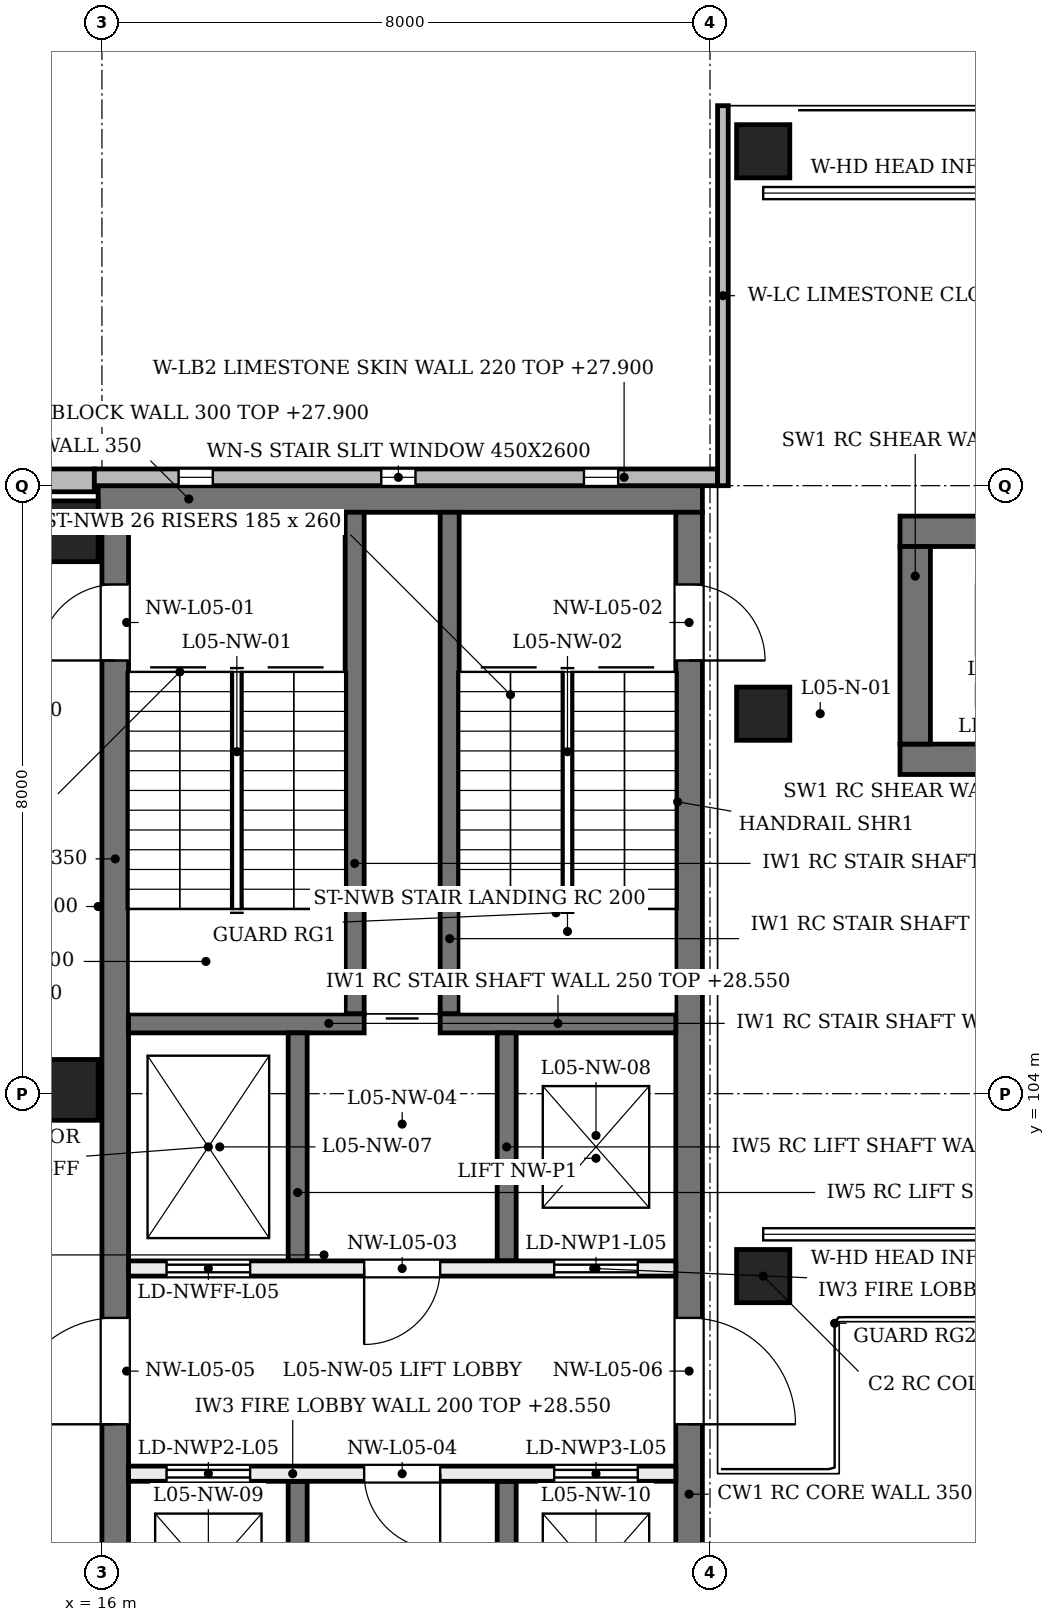
"""IFC4 building model, lengths in metres.
Left out: names, types, materials, properties, quantities, classifications, styles, units other than length and angle.
Written with IfcOpenShell. Run it as: python <this file> out.ifc"""

import sys

from ifc_helpers import new_model, si_unit, direction, frame, frame_2d, origin, origin_2d, place, context, subcontext, project, spatial, rectangle, extrude, element, fill, save


model = new_model("IFC4")
c1 = context("Model", 3, precision=1e-05, world=origin(), true_north=direction((0.0, 1.0)))
c2 = subcontext(c1, "Body", "Model", "MODEL_VIEW")
j1 = project(units=[si_unit("LENGTHUNIT", "METRE"), si_unit("PLANEANGLEUNIT", "RADIAN")], contexts=[c1])
p1 = place(None, origin())
s1 = spatial("IfcSite", under=j1, at=p1, CompositionType="ELEMENT")
p2 = place(p1, origin())
s2 = spatial("IfcBuilding", under=s1, at=p2, CompositionType="ELEMENT")
p3 = place(p2, frame((0.0, 0.0, 24.0)))
s3 = spatial("IfcBuildingStorey", under=s2, at=p3, CompositionType="ELEMENT", Elevation=24.0)
p4 = place(p3, frame((26.5, 108.4, 0.0), z_axis=(0.0, 0.0, 1.0), x_axis=(1.0, 0.0, 0.0)))
e1 = element("IfcWall", 1, at=p4, inside=s3, PredefinedType="SHEAR", context=c2, shape_type="SweptSolid", body=[
    extrude(rectangle(XDim=6.0, YDim=0.4, at=frame_2d((3.0, 0.0))), origin(), (0.0, 0.0, 1.0), 4.58),
])
p5 = place(p4, frame((1.15, 0.0, 0.0)))
e2 = element("IfcOpeningElement", 2, at=p5, cuts=e1, PredefinedType="OPENING", context=c2, shape_type="SweptSolid", body=[
    extrude(rectangle(XDim=1.1, YDim=2.1, at=frame_2d((0.55, 1.05))), frame((0.0, 0.21, 0.0), z_axis=(0.0, -1.0, 0.0), x_axis=(1.0, 0.0, 0.0)), (0.0, 0.0, 1.0), 0.42),
])
p6 = place(p4, frame((3.75, 0.0, 0.0)))
e3 = element("IfcOpeningElement", 3, at=p6, cuts=e1, PredefinedType="OPENING", context=c2, shape_type="SweptSolid", body=[
    extrude(rectangle(XDim=1.1, YDim=2.1, at=frame_2d((0.55, 1.05))), frame((0.0, 0.21, 0.0), z_axis=(0.0, -1.0, 0.0), x_axis=(1.0, 0.0, 0.0)), (0.0, 0.0, 1.0), 0.42),
])
p7 = place(p3, frame((26.5, 111.4, 0.0), z_axis=(0.0, 0.0, 1.0), x_axis=(1.0, 0.0, 0.0)))
e4 = element("IfcWall", 4, at=p7, inside=s3, PredefinedType="SHEAR", context=c2, shape_type="SweptSolid", body=[
    extrude(rectangle(XDim=6.0, YDim=0.4, at=frame_2d((3.0, 0.0))), origin(), (0.0, 0.0, 1.0), 4.58),
])
p8 = place(p3, frame((26.7, 108.6, 0.0), z_axis=(0.0, 0.0, 1.0), x_axis=(0.0, 1.0, 0.0)))
e5 = element("IfcWall", 5, at=p8, inside=s3, PredefinedType="SHEAR", context=c2, shape_type="SweptSolid", body=[
    extrude(rectangle(XDim=2.6, YDim=0.4, at=frame_2d((1.3, 0.0))), origin(), (0.0, 0.0, 1.0), 4.58),
])
p9 = place(p3, frame((15.95, 111.825, 0.0), z_axis=(0.0, 0.0, 1.0), x_axis=(1.0, 0.0, 0.0)))
e6 = element("IfcWall", 6, at=p9, inside=s3, PredefinedType="SHEAR", context=c2, shape_type="SweptSolid", body=[
    extrude(rectangle(XDim=7.95, YDim=0.35, at=frame_2d((3.975, 0.0))), origin(), (0.0, 0.0, 1.0), 4.58),
])
p10 = place(p3, frame((16.175, 96.45, 0.0), z_axis=(0.0, 0.0, 1.0), x_axis=(0.0, 1.0, 0.0)))
e7 = element("IfcWall", 7, at=p10, inside=s3, PredefinedType="SHEAR", context=c2, shape_type="SweptSolid", body=[
    extrude(rectangle(XDim=15.2, YDim=0.35, at=frame_2d((7.6, 0.0))), origin(), (0.0, 0.0, 1.0), 4.58),
])
p11 = place(p10, frame((13.25, 0.0, 0.0)))
e8 = element("IfcOpeningElement", 8, at=p11, cuts=e7, PredefinedType="OPENING", context=c2, shape_type="SweptSolid", body=[
    extrude(rectangle(XDim=1.0, YDim=2.1, at=frame_2d((0.5, 1.05))), frame((0.0, 0.185, 0.0), z_axis=(0.0, -1.0, 0.0), x_axis=(1.0, 0.0, 0.0)), (0.0, 0.0, 1.0), 0.37),
])
p12 = place(p10, frame((3.2, 0.0, 0.0)))
e9 = element("IfcOpeningElement", 9, at=p12, cuts=e7, PredefinedType="OPENING", context=c2, shape_type="SweptSolid", body=[
    extrude(rectangle(XDim=1.4, YDim=2.1, at=frame_2d((0.7, 1.05))), frame((0.0, 0.185, 0.0), z_axis=(0.0, -1.0, 0.0), x_axis=(1.0, 0.0, 0.0)), (0.0, 0.0, 1.0), 0.37),
])
p13 = place(p3, frame((23.725, 96.45, 0.0), z_axis=(0.0, 0.0, 1.0), x_axis=(0.0, 1.0, 0.0)))
e10 = element("IfcWall", 10, at=p13, inside=s3, PredefinedType="SHEAR", context=c2, shape_type="SweptSolid", body=[
    extrude(rectangle(XDim=15.2, YDim=0.35, at=frame_2d((7.6, 0.0))), origin(), (0.0, 0.0, 1.0), 4.58),
])
p14 = place(p13, frame((13.25, 0.0, 0.0)))
e11 = element("IfcOpeningElement", 11, at=p14, cuts=e10, PredefinedType="OPENING", context=c2, shape_type="SweptSolid", body=[
    extrude(rectangle(XDim=1.0, YDim=2.1, at=frame_2d((0.5, 1.05))), frame((0.0, 0.185, 0.0), z_axis=(0.0, -1.0, 0.0), x_axis=(1.0, 0.0, 0.0)), (0.0, 0.0, 1.0), 0.37),
])
p15 = place(p13, frame((3.2, 0.0, 0.0)))
e12 = element("IfcOpeningElement", 12, at=p15, cuts=e10, PredefinedType="OPENING", context=c2, shape_type="SweptSolid", body=[
    extrude(rectangle(XDim=1.4, YDim=2.1, at=frame_2d((0.7, 1.05))), frame((0.0, 0.185, 0.0), z_axis=(0.0, -1.0, 0.0), x_axis=(1.0, 0.0, 0.0)), (0.0, 0.0, 1.0), 0.37),
])
for number, where, z_axis, x_axis in (
    (13, (15.55, 104.05, 0.0), (0.0, 0.0, 1.0), (1.0, 0.0, 0.0)),
    (14, (15.55, 111.4, 0.0), (0.0, 0.0, 1.0), (1.0, 0.0, 0.0)),
):
    element("IfcColumn", number, at=place(p3, frame(where, z_axis=z_axis, x_axis=x_axis)), inside=s3, PredefinedType="COLUMN", context=c2, shape_type="SweptSolid", body=[
        extrude(rectangle(XDim=0.8, YDim=0.8, at=origin_2d()), origin(), (0.0, 0.0, 1.0), 4.58),
    ])
for number, where, z_axis, x_axis in (
    (15, (24.7, 101.6, 0.0), (0.0, 0.0, 1.0), (1.0, 0.0, 0.0)),
    (16, (24.7, 109.0, 0.0), (0.0, 0.0, 1.0), (1.0, 0.0, 0.0)),
    (17, (24.7, 116.4, 0.0), (0.0, 0.0, 1.0), (1.0, 0.0, 0.0)),
):
    element("IfcColumn", number, at=place(p3, frame(where, z_axis=z_axis, x_axis=x_axis)), inside=s3, PredefinedType="COLUMN", context=c2, shape_type="SweptSolid", body=[
        extrude(rectangle(XDim=0.7, YDim=0.7, at=origin_2d()), origin(), (0.0, 0.0, 1.0), 4.58),
    ])
for number, where, z_axis, x_axis in (
    (18, (24.9, 115.85, 4.1), (0.0, 0.0, 1.0), (1.0, 0.0, 0.0)),
    (19, (24.9, 102.15, 4.1), (0.0, 0.0, 1.0), (1.0, 0.0, 0.0)),
):
    element("IfcWall", number, at=place(p3, frame(where, z_axis=z_axis, x_axis=x_axis)), inside=s3, PredefinedType="SOLIDWALL", context=c2, shape_type="SweptSolid", body=[
        extrude(rectangle(XDim=6.9, YDim=0.15, at=frame_2d((3.45, 0.0))), origin(), (0.0, 0.0, 1.0), 0.48),
    ])
p16 = place(p3, frame((8.0, 112.07, 0.0), z_axis=(0.0, 0.0, 1.0), x_axis=(1.0, 0.0, 0.0)))
e20 = element("IfcWall", 20, at=p16, inside=s3, PredefinedType="SOLIDWALL", context=c2, shape_type="SweptSolid", body=[
    extrude(rectangle(XDim=7.9, YDim=0.3, at=frame_2d((3.95, 0.0))), origin(), (0.0, 0.0, 1.0), 3.9),
])
p17 = place(p16, frame((0.717, 0.0, 1.0)))
e21 = element("IfcOpeningElement", 21, at=p17, cuts=e20, PredefinedType="OPENING", context=c2, shape_type="SweptSolid", body=[
    extrude(rectangle(XDim=1.2, YDim=2.4, at=frame_2d((0.6, 1.2))), frame((0.0, 0.16, 0.0), z_axis=(0.0, -1.0, 0.0), x_axis=(1.0, 0.0, 0.0)), (0.0, 0.0, 1.0), 0.32),
])
p18 = place(p16, frame((3.35, 0.0, 1.0)))
e22 = element("IfcOpeningElement", 22, at=p18, cuts=e20, PredefinedType="OPENING", context=c2, shape_type="SweptSolid", body=[
    extrude(rectangle(XDim=1.2, YDim=2.4, at=frame_2d((0.6, 1.2))), frame((0.0, 0.16, 0.0), z_axis=(0.0, -1.0, 0.0), x_axis=(1.0, 0.0, 0.0)), (0.0, 0.0, 1.0), 0.32),
])
p19 = place(p16, frame((5.983, 0.0, 1.0)))
e23 = element("IfcOpeningElement", 23, at=p19, cuts=e20, PredefinedType="OPENING", context=c2, shape_type="SweptSolid", body=[
    extrude(rectangle(XDim=1.2, YDim=2.4, at=frame_2d((0.6, 1.2))), frame((0.0, 0.16, 0.0), z_axis=(0.0, -1.0, 0.0), x_axis=(1.0, 0.0, 0.0)), (0.0, 0.0, 1.0), 0.32),
])
p20 = place(p3, frame((15.9, 112.11, 0.0), z_axis=(0.0, 0.0, 1.0), x_axis=(1.0, 0.0, 0.0)))
e24 = element("IfcWall", 24, at=p20, inside=s3, PredefinedType="SOLIDWALL", context=c2, shape_type="SweptSolid", body=[
    extrude(rectangle(XDim=8.2, YDim=0.22, at=frame_2d((4.1, 0.0))), origin(), (0.0, 0.0, 1.0), 3.9),
])
p21 = place(p20, frame((1.108, 0.0, 0.9)))
e25 = element("IfcOpeningElement", 25, at=p21, cuts=e24, PredefinedType="OPENING", context=c2, shape_type="SweptSolid", body=[
    extrude(rectangle(XDim=0.45, YDim=2.6, at=frame_2d((0.225, 1.3))), frame((0.0, 0.12, 0.0), z_axis=(0.0, -1.0, 0.0), x_axis=(1.0, 0.0, 0.0)), (0.0, 0.0, 1.0), 0.24),
])
p22 = place(p20, frame((3.775, 0.0, 0.9)))
e26 = element("IfcOpeningElement", 26, at=p22, cuts=e24, PredefinedType="OPENING", context=c2, shape_type="SweptSolid", body=[
    extrude(rectangle(XDim=0.45, YDim=2.6, at=frame_2d((0.225, 1.3))), frame((0.0, 0.12, 0.0), z_axis=(0.0, -1.0, 0.0), x_axis=(1.0, 0.0, 0.0)), (0.0, 0.0, 1.0), 0.24),
])
p23 = place(p20, frame((6.442, 0.0, 0.9)))
e27 = element("IfcOpeningElement", 27, at=p23, cuts=e24, PredefinedType="OPENING", context=c2, shape_type="SweptSolid", body=[
    extrude(rectangle(XDim=0.45, YDim=2.6, at=frame_2d((0.225, 1.3))), frame((0.0, 0.12, 0.0), z_axis=(0.0, -1.0, 0.0), x_axis=(1.0, 0.0, 0.0)), (0.0, 0.0, 1.0), 0.24),
])
p24 = place(p3, frame((24.17, 112.0, 0.0), z_axis=(0.0, 0.0, 1.0), x_axis=(0.0, 1.0, 0.0)))
e28 = element("IfcWall", 28, at=p24, inside=s3, PredefinedType="SOLIDWALL", context=c2, shape_type="SweptSolid", body=[
    extrude(rectangle(XDim=5.0, YDim=0.14, at=frame_2d((2.5, 0.0))), origin(), (0.0, 0.0, 1.0), 3.9),
])
for number, where, z_axis, x_axis in (
    (29, (19.325, 111.65, 0.0), (0.0, 0.0, 1.0), (0.0, -1.0, 0.0)),
    (30, (20.575, 111.65, 0.0), (0.0, 0.0, 1.0), (0.0, -1.0, 0.0)),
):
    element("IfcWall", number, at=place(p3, frame(where, z_axis=z_axis, x_axis=x_axis)), inside=s3, PredefinedType="SOLIDWALL", context=c2, shape_type="SweptSolid", body=[
        extrude(rectangle(XDim=6.6, YDim=0.25, at=frame_2d((3.3, 0.0))), origin(), (0.0, 0.0, 1.0), 4.55),
    ])
p25 = place(p3, frame((16.35, 104.925, 0.0), z_axis=(0.0, 0.0, 1.0), x_axis=(1.0, 0.0, 0.0)))
e31 = element("IfcWall", 31, at=p25, inside=s3, PredefinedType="SOLIDWALL", context=c2, shape_type="SweptSolid", body=[
    extrude(rectangle(XDim=3.1, YDim=0.25, at=frame_2d((1.55, 0.0))), origin(), (0.0, 0.0, 1.0), 4.55),
])
p26 = place(p3, frame((20.45, 104.925, 0.0), z_axis=(0.0, 0.0, 1.0), x_axis=(1.0, 0.0, 0.0)))
e32 = element("IfcWall", 32, at=p26, inside=s3, PredefinedType="SOLIDWALL", context=c2, shape_type="SweptSolid", body=[
    extrude(rectangle(XDim=3.1, YDim=0.25, at=frame_2d((1.55, 0.0))), origin(), (0.0, 0.0, 1.0), 4.55),
])
p27 = place(p3, frame((18.575, 104.8, 0.0), z_axis=(0.0, 0.0, 1.0), x_axis=(0.0, -1.0, 0.0)))
e33 = element("IfcWall", 33, at=p27, inside=s3, PredefinedType="SOLIDWALL", context=c2, shape_type="SweptSolid", body=[
    extrude(rectangle(XDim=3.0, YDim=0.25, at=frame_2d((1.5, 0.0))), origin(), (0.0, 0.0, 1.0), 4.55),
])
p28 = place(p3, frame((18.575, 98.9, 0.0), z_axis=(0.0, 0.0, 1.0), x_axis=(0.0, -1.0, 0.0)))
e34 = element("IfcWall", 34, at=p28, inside=s3, PredefinedType="SOLIDWALL", context=c2, shape_type="SweptSolid", body=[
    extrude(rectangle(XDim=2.45, YDim=0.25, at=frame_2d((1.225, 0.0))), origin(), (0.0, 0.0, 1.0), 4.55),
])
p29 = place(p3, frame((21.325, 104.8, 0.0), z_axis=(0.0, 0.0, 1.0), x_axis=(0.0, -1.0, 0.0)))
e35 = element("IfcWall", 35, at=p29, inside=s3, PredefinedType="SOLIDWALL", context=c2, shape_type="SweptSolid", body=[
    extrude(rectangle(XDim=3.0, YDim=0.25, at=frame_2d((1.5, 0.0))), origin(), (0.0, 0.0, 1.0), 4.55),
])
p30 = place(p3, frame((21.325, 98.9, 0.0), z_axis=(0.0, 0.0, 1.0), x_axis=(0.0, -1.0, 0.0)))
e36 = element("IfcWall", 36, at=p30, inside=s3, PredefinedType="SOLIDWALL", context=c2, shape_type="SweptSolid", body=[
    extrude(rectangle(XDim=2.45, YDim=0.25, at=frame_2d((1.225, 0.0))), origin(), (0.0, 0.0, 1.0), 4.55),
])
p31 = place(p3, frame((16.35, 101.7, 0.0), z_axis=(0.0, 0.0, 1.0), x_axis=(1.0, 0.0, 0.0)))
e37 = element("IfcWall", 37, at=p31, inside=s3, PredefinedType="SOLIDWALL", context=c2, shape_type="SweptSolid", body=[
    extrude(rectangle(XDim=7.2, YDim=0.2, at=frame_2d((3.6, 0.0))), origin(), (0.0, 0.0, 1.0), 4.55),
])
p32 = place(p31, frame((0.5, 0.0, 0.0)))
e38 = element("IfcOpeningElement", 38, at=p32, cuts=e37, PredefinedType="OPENING", context=c2, shape_type="SweptSolid", body=[
    extrude(rectangle(XDim=1.1, YDim=2.1, at=frame_2d((0.55, 1.05))), frame((0.0, 0.11, 0.0), z_axis=(0.0, -1.0, 0.0), x_axis=(1.0, 0.0, 0.0)), (0.0, 0.0, 1.0), 0.22),
])
p33 = place(p31, frame((5.6, 0.0, 0.0)))
e39 = element("IfcOpeningElement", 39, at=p33, cuts=e37, PredefinedType="OPENING", context=c2, shape_type="SweptSolid", body=[
    extrude(rectangle(XDim=1.1, YDim=2.1, at=frame_2d((0.55, 1.05))), frame((0.0, 0.11, 0.0), z_axis=(0.0, -1.0, 0.0), x_axis=(1.0, 0.0, 0.0)), (0.0, 0.0, 1.0), 0.22),
])
p34 = place(p31, frame((3.1, 0.0, 0.0)))
e40 = element("IfcOpeningElement", 40, at=p34, cuts=e37, PredefinedType="OPENING", context=c2, shape_type="SweptSolid", body=[
    extrude(rectangle(XDim=1.0, YDim=2.1, at=frame_2d((0.5, 1.05))), frame((0.0, 0.11, 0.0), z_axis=(0.0, -1.0, 0.0), x_axis=(1.0, 0.0, 0.0)), (0.0, 0.0, 1.0), 0.22),
])
p35 = place(p3, frame((16.35, 99.0, 0.0), z_axis=(0.0, 0.0, 1.0), x_axis=(1.0, 0.0, 0.0)))
e41 = element("IfcWall", 41, at=p35, inside=s3, PredefinedType="SOLIDWALL", context=c2, shape_type="SweptSolid", body=[
    extrude(rectangle(XDim=7.2, YDim=0.2, at=frame_2d((3.6, 0.0))), origin(), (0.0, 0.0, 1.0), 4.55),
])
p36 = place(p35, frame((0.5, 0.0, 0.0)))
e42 = element("IfcOpeningElement", 42, at=p36, cuts=e41, PredefinedType="OPENING", context=c2, shape_type="SweptSolid", body=[
    extrude(rectangle(XDim=1.1, YDim=2.1, at=frame_2d((0.55, 1.05))), frame((0.0, 0.11, 0.0), z_axis=(0.0, -1.0, 0.0), x_axis=(1.0, 0.0, 0.0)), (0.0, 0.0, 1.0), 0.22),
])
p37 = place(p35, frame((5.6, 0.0, 0.0)))
e43 = element("IfcOpeningElement", 43, at=p37, cuts=e41, PredefinedType="OPENING", context=c2, shape_type="SweptSolid", body=[
    extrude(rectangle(XDim=1.1, YDim=2.1, at=frame_2d((0.55, 1.05))), frame((0.0, 0.11, 0.0), z_axis=(0.0, -1.0, 0.0), x_axis=(1.0, 0.0, 0.0)), (0.0, 0.0, 1.0), 0.22),
])
p38 = place(p35, frame((3.1, 0.0, 0.0)))
e44 = element("IfcOpeningElement", 44, at=p38, cuts=e41, PredefinedType="OPENING", context=c2, shape_type="SweptSolid", body=[
    extrude(rectangle(XDim=1.0, YDim=2.1, at=frame_2d((0.5, 1.05))), frame((0.0, 0.11, 0.0), z_axis=(0.0, -1.0, 0.0), x_axis=(1.0, 0.0, 0.0)), (0.0, 0.0, 1.0), 0.22),
])
p39 = place(p21, origin())
e45 = element("IfcWindow", 45, at=p39, inside=s3, PartitioningType="SINGLE_PANEL", PredefinedType="WINDOW", context=c2, shape_type="SweptSolid", body=[
    extrude(rectangle(XDim=0.45, YDim=2.6, at=frame_2d((0.225, 1.3))), frame((0.0, 0.03, 0.0), z_axis=(0.0, -1.0, 0.0), x_axis=(1.0, 0.0, 0.0)), (0.0, 0.0, 1.0), 0.06),
])
fill(e25, e45)
p40 = place(p22, origin())
e46 = element("IfcWindow", 46, at=p40, inside=s3, PartitioningType="SINGLE_PANEL", PredefinedType="WINDOW", context=c2, shape_type="SweptSolid", body=[
    extrude(rectangle(XDim=0.45, YDim=2.6, at=frame_2d((0.225, 1.3))), frame((0.0, 0.03, 0.0), z_axis=(0.0, -1.0, 0.0), x_axis=(1.0, 0.0, 0.0)), (0.0, 0.0, 1.0), 0.06),
])
fill(e26, e46)
p41 = place(p23, origin())
e47 = element("IfcWindow", 47, at=p41, inside=s3, PartitioningType="SINGLE_PANEL", PredefinedType="WINDOW", context=c2, shape_type="SweptSolid", body=[
    extrude(rectangle(XDim=0.45, YDim=2.6, at=frame_2d((0.225, 1.3))), frame((0.0, 0.03, 0.0), z_axis=(0.0, -1.0, 0.0), x_axis=(1.0, 0.0, 0.0)), (0.0, 0.0, 1.0), 0.06),
])
fill(e27, e47)
p42 = place(p11, origin())
e48 = element("IfcDoor", 48, at=p42, inside=s3, OperationType="SINGLE_SWING_LEFT", PredefinedType="DOOR", context=c2, shape_type="SweptSolid", body=[
    extrude(rectangle(XDim=1.0, YDim=2.1, at=frame_2d((0.5, 1.05))), frame((0.0, 0.025, 0.0), z_axis=(0.0, -1.0, 0.0), x_axis=(1.0, 0.0, 0.0)), (0.0, 0.0, 1.0), 0.05),
])
fill(e8, e48)
p43 = place(p14, frame((1.0, 0.0, 0.0), z_axis=(0.0, 0.0, 1.0), x_axis=(-1.0, 0.0, 0.0)))
e49 = element("IfcDoor", 49, at=p43, inside=s3, OperationType="SINGLE_SWING_LEFT", PredefinedType="DOOR", context=c2, shape_type="SweptSolid", body=[
    extrude(rectangle(XDim=1.0, YDim=2.1, at=frame_2d((0.5, 1.05))), frame((0.0, 0.025, 0.0), z_axis=(0.0, -1.0, 0.0), x_axis=(1.0, 0.0, 0.0)), (0.0, 0.0, 1.0), 0.05),
])
fill(e11, e49)
p44 = place(p32, frame((1.1, 0.0, 0.0), z_axis=(0.0, 0.0, 1.0), x_axis=(-1.0, 0.0, 0.0)))
e50 = element("IfcDoor", 50, at=p44, inside=s3, OperationType="DOUBLE_DOOR_SLIDING", PredefinedType="DOOR", context=c2, shape_type="SweptSolid", body=[
    extrude(rectangle(XDim=1.1, YDim=2.1, at=frame_2d((0.55, 1.05))), frame((0.0, 0.025, 0.0), z_axis=(0.0, -1.0, 0.0), x_axis=(1.0, 0.0, 0.0)), (0.0, 0.0, 1.0), 0.05),
])
fill(e38, e50)
p45 = place(p33, frame((1.1, 0.0, 0.0), z_axis=(0.0, 0.0, 1.0), x_axis=(-1.0, 0.0, 0.0)))
e51 = element("IfcDoor", 51, at=p45, inside=s3, OperationType="DOUBLE_DOOR_SLIDING", PredefinedType="DOOR", context=c2, shape_type="SweptSolid", body=[
    extrude(rectangle(XDim=1.1, YDim=2.1, at=frame_2d((0.55, 1.05))), frame((0.0, 0.025, 0.0), z_axis=(0.0, -1.0, 0.0), x_axis=(1.0, 0.0, 0.0)), (0.0, 0.0, 1.0), 0.05),
])
fill(e39, e51)
p46 = place(p36, origin())
e52 = element("IfcDoor", 52, at=p46, inside=s3, OperationType="DOUBLE_DOOR_SLIDING", PredefinedType="DOOR", context=c2, shape_type="SweptSolid", body=[
    extrude(rectangle(XDim=1.1, YDim=2.1, at=frame_2d((0.55, 1.05))), frame((0.0, 0.025, 0.0), z_axis=(0.0, -1.0, 0.0), x_axis=(1.0, 0.0, 0.0)), (0.0, 0.0, 1.0), 0.05),
])
fill(e42, e52)
p47 = place(p37, origin())
e53 = element("IfcDoor", 53, at=p47, inside=s3, OperationType="DOUBLE_DOOR_SLIDING", PredefinedType="DOOR", context=c2, shape_type="SweptSolid", body=[
    extrude(rectangle(XDim=1.1, YDim=2.1, at=frame_2d((0.55, 1.05))), frame((0.0, 0.025, 0.0), z_axis=(0.0, -1.0, 0.0), x_axis=(1.0, 0.0, 0.0)), (0.0, 0.0, 1.0), 0.05),
])
fill(e43, e53)
p48 = place(p34, frame((1.0, 0.0, 0.0), z_axis=(0.0, 0.0, 1.0), x_axis=(-1.0, 0.0, 0.0)))
e54 = element("IfcDoor", 54, at=p48, inside=s3, OperationType="SINGLE_SWING_LEFT", PredefinedType="DOOR", context=c2, shape_type="SweptSolid", body=[
    extrude(rectangle(XDim=1.0, YDim=2.1, at=frame_2d((0.5, 1.05))), frame((0.0, 0.025, 0.0), z_axis=(0.0, -1.0, 0.0), x_axis=(1.0, 0.0, 0.0)), (0.0, 0.0, 1.0), 0.05),
])
fill(e40, e54)
p49 = place(p38, origin())
e55 = element("IfcDoor", 55, at=p49, inside=s3, OperationType="SINGLE_SWING_RIGHT", PredefinedType="DOOR", context=c2, shape_type="SweptSolid", body=[
    extrude(rectangle(XDim=1.0, YDim=2.1, at=frame_2d((0.5, 1.05))), frame((0.0, 0.025, 0.0), z_axis=(0.0, -1.0, 0.0), x_axis=(1.0, 0.0, 0.0)), (0.0, 0.0, 1.0), 0.05),
])
fill(e44, e55)
p50 = place(p12, origin())
e56 = element("IfcDoor", 56, at=p50, inside=s3, OperationType="SINGLE_SWING_LEFT", PredefinedType="DOOR", context=c2, shape_type="SweptSolid", body=[
    extrude(rectangle(XDim=1.4, YDim=2.1, at=frame_2d((0.7, 1.05))), frame((0.0, 0.025, 0.0), z_axis=(0.0, -1.0, 0.0), x_axis=(1.0, 0.0, 0.0)), (0.0, 0.0, 1.0), 0.05),
])
fill(e9, e56)
p51 = place(p15, frame((1.4, 0.0, 0.0), z_axis=(0.0, 0.0, 1.0), x_axis=(-1.0, 0.0, 0.0)))
e57 = element("IfcDoor", 57, at=p51, inside=s3, OperationType="SINGLE_SWING_LEFT", PredefinedType="DOOR", context=c2, shape_type="SweptSolid", body=[
    extrude(rectangle(XDim=1.4, YDim=2.1, at=frame_2d((0.7, 1.05))), frame((0.0, 0.025, 0.0), z_axis=(0.0, -1.0, 0.0), x_axis=(1.0, 0.0, 0.0)), (0.0, 0.0, 1.0), 0.05),
])
fill(e12, e57)
save(model, sys.argv[1])
